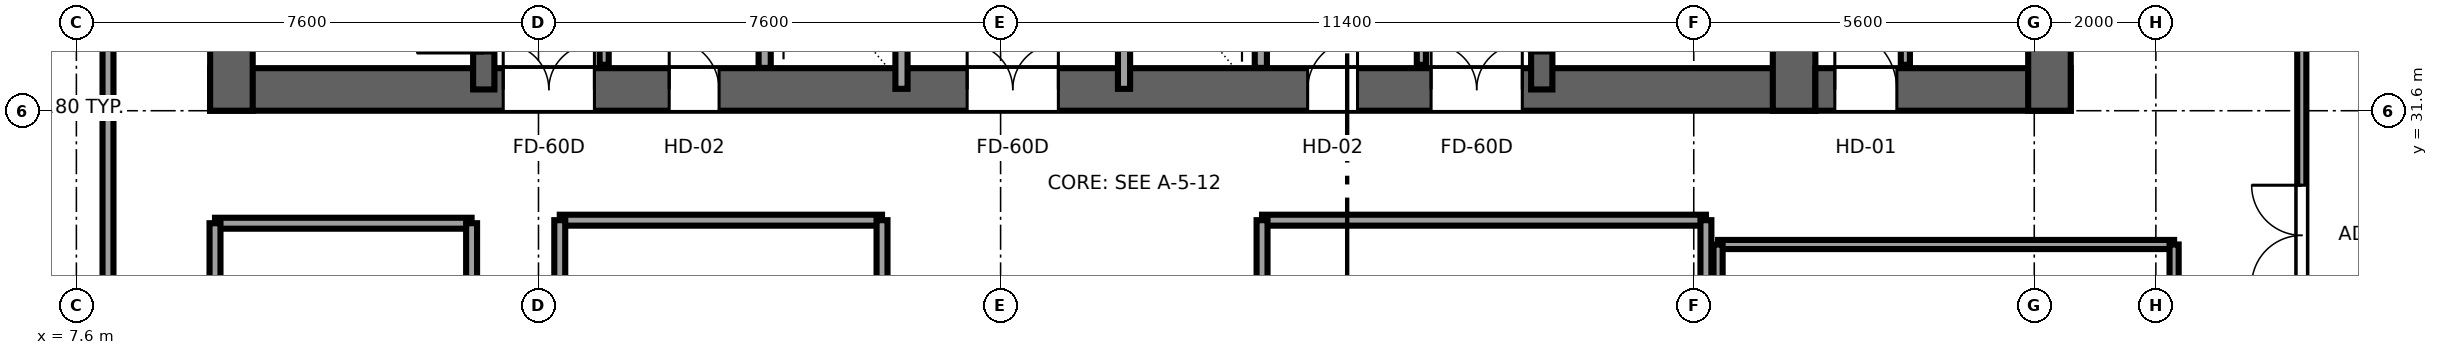
"""IFC4 building model, lengths in metres.
Left out: names, types, materials, properties, quantities, classifications, styles, units other than length and angle.
Written with IfcOpenShell. Run it as: python <this file> out.ifc"""

import sys

from ifc_helpers import new_model, si_unit, direction, frame, frame_2d, origin, place, context, subcontext, project, spatial, rectangle, extrude, source, transform, mapped, element, fill, save


model = new_model("IFC4")
c1 = context("Model", 3, precision=1e-05, world=origin(), true_north=direction((0.0, 1.0)))
c2 = subcontext(c1, "Body", "Model", "MODEL_VIEW")
j1 = project(units=[si_unit("LENGTHUNIT", "METRE"), si_unit("PLANEANGLEUNIT", "RADIAN")], contexts=[c1])
p1 = place(None, origin())
s1 = spatial("IfcSite", under=j1, at=p1, CompositionType="ELEMENT")
p2 = place(p1, origin())
s2 = spatial("IfcBuilding", under=s1, at=p2, CompositionType="ELEMENT")
p3 = place(p2, frame((0.0, 0.0, 104.45)))
s3 = spatial("IfcBuildingStorey", under=s2, at=p3, CompositionType="ELEMENT", Elevation=104.45)
p4 = place(p3, frame((9.8, 31.95, 0.0), z_axis=(0.0, 0.0, 1.0), x_axis=(1.0, 0.0, 0.0)))
e1 = element("IfcWall", 1, at=p4, inside=s3, PredefinedType="SHEAR", context=c2, shape_type="SweptSolid", body=[
    extrude(rectangle(XDim=26.4, YDim=0.7, at=frame_2d((13.2, 0.0))), origin(), (0.0, 0.0, 1.0), 3.55),
])
p5 = place(p4, frame((6.32, 0.0, 0.0), z_axis=(0.0, 0.0, 1.0), x_axis=(-1.0, 0.0, 0.0)))
e2 = element("IfcOpeningElement", 2, at=p5, cuts=e1, PredefinedType="OPENING", context=c2, shape_type="SweptSolid", body=[
    extrude(rectangle(XDim=1.5, YDim=2.04, at=frame_2d((0.75, 1.02))), frame((0.0, 0.36, 0.0), z_axis=(0.0, -1.0, 0.0), x_axis=(1.0, 0.0, 0.0)), (0.0, 0.0, 1.0), 0.72),
])
p6 = place(p4, frame((13.95, 0.0, 0.0), z_axis=(0.0, 0.0, 1.0), x_axis=(-1.0, 0.0, 0.0)))
e3 = element("IfcOpeningElement", 3, at=p6, cuts=e1, PredefinedType="OPENING", context=c2, shape_type="SweptSolid", body=[
    extrude(rectangle(XDim=1.5, YDim=2.04, at=frame_2d((0.75, 1.02))), frame((0.0, 0.36, 0.0), z_axis=(0.0, -1.0, 0.0), x_axis=(1.0, 0.0, 0.0)), (0.0, 0.0, 1.0), 0.72),
])
p7 = place(p4, frame((21.58, 0.0, 0.0), z_axis=(0.0, 0.0, 1.0), x_axis=(-1.0, 0.0, 0.0)))
e4 = element("IfcOpeningElement", 4, at=p7, cuts=e1, PredefinedType="OPENING", context=c2, shape_type="SweptSolid", body=[
    extrude(rectangle(XDim=1.5, YDim=2.04, at=frame_2d((0.75, 1.02))), frame((0.0, 0.36, 0.0), z_axis=(0.0, -1.0, 0.0), x_axis=(1.0, 0.0, 0.0)), (0.0, 0.0, 1.0), 0.72),
])
p8 = place(p4, frame((8.37, 0.0, 0.0), z_axis=(0.0, 0.0, 1.0), x_axis=(-1.0, 0.0, 0.0)))
e5 = element("IfcOpeningElement", 5, at=p8, cuts=e1, PredefinedType="OPENING", context=c2, shape_type="SweptSolid", body=[
    extrude(rectangle(XDim=0.82, YDim=2.01, at=frame_2d((0.41, 1.005))), frame((0.0, 0.36, 0.0), z_axis=(0.0, -1.0, 0.0), x_axis=(1.0, 0.0, 0.0)), (0.0, 0.0, 1.0), 0.72),
])
p9 = place(p4, frame((18.87, 0.0, 0.0), z_axis=(0.0, 0.0, 1.0), x_axis=(-1.0, 0.0, 0.0)))
e6 = element("IfcOpeningElement", 6, at=p9, cuts=e1, PredefinedType="OPENING", context=c2, shape_type="SweptSolid", body=[
    extrude(rectangle(XDim=0.82, YDim=2.01, at=frame_2d((0.41, 1.005))), frame((0.0, 0.36, 0.0), z_axis=(0.0, -1.0, 0.0), x_axis=(1.0, 0.0, 0.0)), (0.0, 0.0, 1.0), 0.72),
])
for number, where, z_axis, x_axis in (
    (7, (10.15, 31.6, 0.0), (0.0, 0.0, 1.0), (0.0, 1.0, 0.0)),
    (8, (35.85, 31.6, 0.0), (0.0, 0.0, 1.0), (0.0, 1.0, 0.0)),
):
    element("IfcWall", number, at=place(p3, frame(where, z_axis=z_axis, x_axis=x_axis)), inside=s3, PredefinedType="SHEAR", context=c2, shape_type="SweptSolid", body=[
        extrude(rectangle(XDim=13.6, YDim=0.7, at=frame_2d((6.8, 0.0))), origin(), (0.0, 0.0, 1.0), 3.55),
    ])
p10 = place(p3, frame((14.3, 31.95, 0.0), z_axis=(0.0, 0.0, 1.0), x_axis=(0.0, 1.0, 0.0)))
e9 = element("IfcWall", 9, at=p10, inside=s3, PredefinedType="SHEAR", context=c2, shape_type="SweptSolid", body=[
    extrude(rectangle(XDim=12.9, YDim=0.35, at=frame_2d((6.45, 0.0))), origin(), (0.0, 0.0, 1.0), 3.55),
])
p11 = place(p10, frame((0.6, 0.0, 0.0)))
e10 = element("IfcOpeningElement", 10, at=p11, cuts=e9, PredefinedType="OPENING", context=c2, shape_type="SweptSolid", body=[
    extrude(rectangle(XDim=1.1, YDim=2.12, at=frame_2d((0.55, 1.06))), frame((0.0, 0.185, 0.0), z_axis=(0.0, -1.0, 0.0), x_axis=(1.0, 0.0, 0.0)), (0.0, 0.0, 1.0), 0.37),
])
p12 = place(p3, frame((31.7, 31.95, 0.0), z_axis=(0.0, 0.0, 1.0), x_axis=(0.0, 1.0, 0.0)))
e11 = element("IfcWall", 11, at=p12, inside=s3, PredefinedType="SHEAR", context=c2, shape_type="SweptSolid", body=[
    extrude(rectangle(XDim=12.9, YDim=0.35, at=frame_2d((6.45, 0.0))), origin(), (0.0, 0.0, 1.0), 3.55),
])
p13 = place(p12, frame((1.7, 0.0, 0.0), z_axis=(0.0, 0.0, 1.0), x_axis=(-1.0, 0.0, 0.0)))
e12 = element("IfcOpeningElement", 12, at=p13, cuts=e11, PredefinedType="OPENING", context=c2, shape_type="SweptSolid", body=[
    extrude(rectangle(XDim=1.1, YDim=2.12, at=frame_2d((0.55, 1.06))), frame((0.0, 0.185, 0.0), z_axis=(0.0, -1.0, 0.0), x_axis=(1.0, 0.0, 0.0)), (0.0, 0.0, 1.0), 0.37),
])
p14 = place(p3, frame((36.2, 31.95, 0.0), z_axis=(0.0, 0.0, 1.0), x_axis=(1.0, 0.0, 0.0)))
e13 = element("IfcWall", 13, at=p14, inside=s3, PredefinedType="SHEAR", context=c2, shape_type="SweptSolid", body=[
    extrude(rectangle(XDim=4.2, YDim=0.7, at=frame_2d((2.1, 0.0))), origin(), (0.0, 0.0, 1.0), 3.55),
])
p15 = place(p14, frame((1.34, 0.0, 0.0), z_axis=(0.0, 0.0, 1.0), x_axis=(-1.0, 0.0, 0.0)))
e14 = element("IfcOpeningElement", 14, at=p15, cuts=e13, PredefinedType="OPENING", context=c2, shape_type="SweptSolid", body=[
    extrude(rectangle(XDim=1.02, YDim=2.03, at=frame_2d((0.51, 1.015))), frame((0.0, 0.36, 0.0), z_axis=(0.0, -1.0, 0.0), x_axis=(1.0, 0.0, 0.0)), (0.0, 0.0, 1.0), 0.72),
])
p16 = place(p3, frame((40.05, 31.6, 0.0), z_axis=(0.0, 0.0, 1.0), x_axis=(0.0, 1.0, 0.0)))
e15 = element("IfcWall", 15, at=p16, inside=s3, PredefinedType="SHEAR", context=c2, shape_type="SweptSolid", body=[
    extrude(rectangle(XDim=13.6, YDim=0.7, at=frame_2d((6.8, 0.0))), origin(), (0.0, 0.0, 1.0), 3.55),
])
for number, where, z_axis, x_axis in (
    (16, (18.92, 32.304, 0.0), (0.0, 0.0, 1.0), (0.0, 1.0, 0.0)),
    (17, (27.08, 32.304, 0.0), (0.0, 0.0, 1.0), (0.0, 1.0, 0.0)),
):
    element("IfcWall", number, at=place(p3, frame(where, z_axis=z_axis, x_axis=x_axis)), inside=s3, PredefinedType="SOLIDWALL", context=c2, shape_type="SweptSolid", body=[
        extrude(rectangle(XDim=3.846, YDim=0.2, at=frame_2d((1.923, 0.0))), origin(), (0.0, 0.0, 1.0), 3.37),
    ])
p17 = place(p3, frame((21.17, 31.96, 0.0), z_axis=(0.0, 0.0, 1.0), x_axis=(0.0, 1.0, 0.0)))
e18 = element("IfcWall", 18, at=p17, inside=s3, PredefinedType="SOLIDWALL", context=c2, shape_type="SweptSolid", body=[
    extrude(rectangle(XDim=12.58, YDim=0.2, at=frame_2d((6.29, 0.0))), origin(), (0.0, 0.0, 1.0), 3.37),
])
p18 = place(p17, frame((5.74, 0.0, 0.0)))
e19 = element("IfcOpeningElement", 19, at=p18, cuts=e18, PredefinedType="OPENING", context=c2, shape_type="SweptSolid", body=[
    extrude(rectangle(XDim=1.1, YDim=2.12, at=frame_2d((0.55, 1.06))), frame((0.0, 0.11, 0.0), z_axis=(0.0, -1.0, 0.0), x_axis=(1.0, 0.0, 0.0)), (0.0, 0.0, 1.0), 0.22),
])
p19 = place(p17, frame((8.24, 0.0, 0.0)))
e20 = element("IfcOpeningElement", 20, at=p19, cuts=e18, PredefinedType="OPENING", context=c2, shape_type="SweptSolid", body=[
    extrude(rectangle(XDim=1.1, YDim=2.12, at=frame_2d((0.55, 1.06))), frame((0.0, 0.11, 0.0), z_axis=(0.0, -1.0, 0.0), x_axis=(1.0, 0.0, 0.0)), (0.0, 0.0, 1.0), 0.22),
])
p20 = place(p3, frame((24.83, 31.96, 0.0), z_axis=(0.0, 0.0, 1.0), x_axis=(0.0, 1.0, 0.0)))
e21 = element("IfcWall", 21, at=p20, inside=s3, PredefinedType="SOLIDWALL", context=c2, shape_type="SweptSolid", body=[
    extrude(rectangle(XDim=12.58, YDim=0.2, at=frame_2d((6.29, 0.0))), origin(), (0.0, 0.0, 1.0), 3.37),
])
p21 = place(p20, frame((5.74, 0.0, 0.0)))
e22 = element("IfcOpeningElement", 22, at=p21, cuts=e21, PredefinedType="OPENING", context=c2, shape_type="SweptSolid", body=[
    extrude(rectangle(XDim=1.1, YDim=2.12, at=frame_2d((0.55, 1.06))), frame((0.0, 0.11, 0.0), z_axis=(0.0, -1.0, 0.0), x_axis=(1.0, 0.0, 0.0)), (0.0, 0.0, 1.0), 0.22),
])
p22 = place(p20, frame((8.24, 0.0, 0.0)))
e23 = element("IfcOpeningElement", 23, at=p22, cuts=e21, PredefinedType="OPENING", context=c2, shape_type="SweptSolid", body=[
    extrude(rectangle(XDim=1.1, YDim=2.12, at=frame_2d((0.55, 1.06))), frame((0.0, 0.11, 0.0), z_axis=(0.0, -1.0, 0.0), x_axis=(1.0, 0.0, 0.0)), (0.0, 0.0, 1.0), 0.22),
])
for number, where, z_axis, x_axis in (
    (24, (16.28, 32.355, 0.0), (0.0, 0.0, 1.0), (0.0, 1.0, 0.0)),
    (25, (29.72, 32.355, 0.0), (0.0, 0.0, 1.0), (0.0, 1.0, 0.0)),
):
    element("IfcWall", number, at=place(p3, frame(where, z_axis=z_axis, x_axis=x_axis)), inside=s3, PredefinedType="PARTITIONING", context=c2, shape_type="SweptSolid", body=[
        extrude(rectangle(XDim=0.865, YDim=0.15, at=frame_2d((0.433, 0.0))), origin(), (0.0, 0.0, 1.0), 3.37),
    ])
p23 = place(p3, frame((37.68, 32.355, 0.0), z_axis=(0.0, 0.0, 1.0), x_axis=(0.0, 1.0, 0.0)))
e26 = element("IfcWall", 26, at=p23, inside=s3, PredefinedType="PARTITIONING", context=c2, shape_type="SweptSolid", body=[
    extrude(rectangle(XDim=7.845, YDim=0.15, at=frame_2d((3.922, 0.0))), origin(), (0.0, 0.0, 1.0), 3.37),
])
p24 = place(p23, frame((3.413, 0.0, 0.0)))
e27 = element("IfcOpeningElement", 27, at=p24, cuts=e26, PredefinedType="OPENING", context=c2, shape_type="SweptSolid", body=[
    extrude(rectangle(XDim=1.02, YDim=2.03, at=frame_2d((0.51, 1.015))), frame((0.0, 0.085, 0.0), z_axis=(0.0, -1.0, 0.0), x_axis=(1.0, 0.0, 0.0)), (0.0, 0.0, 1.0), 0.17),
])
p25 = place(p3, frame((8.12, 20.7, 0.0), z_axis=(0.0, 0.0, 1.0), x_axis=(0.0, 1.0, 0.0)))
e28 = element("IfcWall", 28, at=p25, inside=s3, PredefinedType="PARTITIONING", context=c2, shape_type="SweptSolid", body=[
    extrude(rectangle(XDim=15.1, YDim=0.18, at=frame_2d((7.55, 0.0))), origin(), (0.0, 0.0, 1.0), 3.37),
])
p26 = place(p25, frame((5.15, 0.0, 0.0)))
e29 = element("IfcOpeningElement", 29, at=p26, cuts=e28, PredefinedType="OPENING", context=c2, shape_type="SweptSolid", body=[
    extrude(rectangle(XDim=1.65, YDim=2.15, at=frame_2d((0.825, 1.075))), frame((0.0, 0.1, 0.0), z_axis=(0.0, -1.0, 0.0), x_axis=(1.0, 0.0, 0.0)), (0.0, 0.0, 1.0), 0.2),
])
p27 = place(p3, frame((44.2, 24.5, 0.0), z_axis=(0.0, 0.0, 1.0), x_axis=(0.0, 1.0, 0.0)))
e30 = element("IfcWall", 30, at=p27, inside=s3, PredefinedType="PARTITIONING", context=c2, shape_type="SweptSolid", body=[
    extrude(rectangle(XDim=10.1, YDim=0.15, at=frame_2d((5.05, 0.0))), origin(), (0.0, 0.0, 1.0), 3.37),
])
p28 = place(p27, frame((4.225, 0.0, 0.0)))
e31 = element("IfcOpeningElement", 31, at=p28, cuts=e30, PredefinedType="OPENING", context=c2, shape_type="SweptSolid", body=[
    extrude(rectangle(XDim=1.65, YDim=2.15, at=frame_2d((0.825, 1.075))), frame((0.0, 0.085, 0.0), z_axis=(0.0, -1.0, 0.0), x_axis=(1.0, 0.0, 0.0)), (0.0, 0.0, 1.0), 0.17),
])
p29 = place(p3, frame((9.88, 29.75, 0.0), z_axis=(0.0, 0.0, 1.0), x_axis=(1.0, 0.0, 0.0)))
e32 = element("IfcWall", 32, at=p29, inside=s3, PredefinedType="PARTITIONING", context=c2, shape_type="SweptSolid", body=[
    extrude(rectangle(XDim=4.22, YDim=0.18, at=frame_2d((2.11, 0.0))), origin(), (0.0, 0.0, 1.0), 3.37),
])
for number, where, z_axis, x_axis in (
    (33, (9.88, 20.7, 0.0), (0.0, 0.0, 1.0), (0.0, 1.0, 0.0)),
    (34, (14.1, 20.7, 0.0), (0.0, 0.0, 1.0), (0.0, 1.0, 0.0)),
):
    element("IfcWall", number, at=place(p3, frame(where, z_axis=z_axis, x_axis=x_axis)), inside=s3, PredefinedType="PARTITIONING", context=c2, shape_type="SweptSolid", body=[
        extrude(rectangle(XDim=9.05, YDim=0.18, at=frame_2d((4.525, 0.0))), origin(), (0.0, 0.0, 1.0), 3.37),
    ])
p30 = place(p3, frame((27.1, 29.8, 0.0), z_axis=(0.0, 0.0, 1.0), x_axis=(1.0, 0.0, 0.0)))
e35 = element("IfcWall", 35, at=p30, inside=s3, PredefinedType="PARTITIONING", context=c2, shape_type="SweptSolid", body=[
    extrude(rectangle(XDim=7.3, YDim=0.18, at=frame_2d((3.65, 0.0))), origin(), (0.0, 0.0, 1.0), 3.37),
])
for number, where, z_axis, x_axis in (
    (36, (27.1, 20.7, 0.0), (0.0, 0.0, 1.0), (0.0, 1.0, 0.0)),
    (37, (34.4, 20.7, 0.0), (0.0, 0.0, 1.0), (0.0, 1.0, 0.0)),
):
    element("IfcWall", number, at=place(p3, frame(where, z_axis=z_axis, x_axis=x_axis)), inside=s3, PredefinedType="PARTITIONING", context=c2, shape_type="SweptSolid", body=[
        extrude(rectangle(XDim=9.1, YDim=0.18, at=frame_2d((4.55, 0.0))), origin(), (0.0, 0.0, 1.0), 3.37),
    ])
p31 = place(p3, frame((15.55, 29.8, 0.0), z_axis=(0.0, 0.0, 1.0), x_axis=(1.0, 0.0, 0.0)))
e38 = element("IfcWall", 38, at=p31, inside=s3, PredefinedType="PARTITIONING", context=c2, shape_type="SweptSolid", body=[
    extrude(rectangle(XDim=5.3, YDim=0.18, at=frame_2d((2.65, 0.0))), origin(), (0.0, 0.0, 1.0), 3.37),
])
for number, where, z_axis, x_axis in (
    (39, (15.55, 20.7, 0.0), (0.0, 0.0, 1.0), (0.0, 1.0, 0.0)),
    (40, (20.85, 20.7, 0.0), (0.0, 0.0, 1.0), (0.0, 1.0, 0.0)),
):
    element("IfcWall", number, at=place(p3, frame(where, z_axis=z_axis, x_axis=x_axis)), inside=s3, PredefinedType="PARTITIONING", context=c2, shape_type="SweptSolid", body=[
        extrude(rectangle(XDim=9.1, YDim=0.18, at=frame_2d((4.55, 0.0))), origin(), (0.0, 0.0, 1.0), 3.37),
    ])
p32 = place(p3, frame((34.6, 29.4, 0.0), z_axis=(0.0, 0.0, 1.0), x_axis=(1.0, 0.0, 0.0)))
e41 = element("IfcWall", 41, at=p32, inside=s3, PredefinedType="PARTITIONING", context=c2, shape_type="SweptSolid", body=[
    extrude(rectangle(XDim=7.5, YDim=0.15, at=frame_2d((3.75, 0.0))), origin(), (0.0, 0.0, 1.0), 3.37),
])
p33 = place(p3, frame((34.6, 20.7, 0.0), z_axis=(0.0, 0.0, 1.0), x_axis=(0.0, 1.0, 0.0)))
e42 = element("IfcWall", 42, at=p33, inside=s3, PredefinedType="PARTITIONING", context=c2, shape_type="SweptSolid", body=[
    extrude(rectangle(XDim=8.7, YDim=0.15, at=frame_2d((4.35, 0.0))), origin(), (0.0, 0.0, 1.0), 3.37),
])
p34 = place(p3, frame((42.1, 20.7, 0.0), z_axis=(0.0, 0.0, 1.0), x_axis=(0.0, 1.0, 0.0)))
e43 = element("IfcWall", 43, at=p34, inside=s3, PredefinedType="PARTITIONING", context=c2, shape_type="SweptSolid", body=[
    extrude(rectangle(XDim=8.7, YDim=0.15, at=frame_2d((4.35, 0.0))), origin(), (0.0, 0.0, 1.0), 2.16),
])
m1 = source(origin(), c2, "Body", "SweptSolid", [
    extrude(rectangle(XDim=1.1, YDim=2.12, at=frame_2d((0.55, 1.06))), frame((0.0, 0.025, 0.0), z_axis=(0.0, -1.0, 0.0), x_axis=(1.0, 0.0, 0.0)), (0.0, 0.0, 1.0), 0.05),
])
p35 = place(p11, origin())
e44 = element("IfcDoor", 44, at=p35, inside=s3, OperationType="SINGLE_SWING_LEFT", PredefinedType="DOOR", context=c2, shape_type="MappedRepresentation", body=[
    mapped(m1, transform((0.0, 0.0, 0.0), x_axis=(1.0, 0.0, 0.0), y_axis=(0.0, 1.0, 0.0), z_axis=(0.0, 0.0, 1.0), scale=1.0)),
])
fill(e10, e44)
p36 = place(p13, origin())
e45 = element("IfcDoor", 45, at=p36, inside=s3, OperationType="SINGLE_SWING_RIGHT", PredefinedType="DOOR", context=c2, shape_type="MappedRepresentation", body=[
    mapped(m1, transform((0.0, 0.0, 0.0), x_axis=(1.0, 0.0, 0.0), y_axis=(0.0, 1.0, 0.0), z_axis=(0.0, 0.0, 1.0), scale=1.0)),
])
fill(e12, e45)
m2 = source(origin(), c2, "Body", "SweptSolid", [
    extrude(rectangle(XDim=1.5, YDim=2.04, at=frame_2d((0.75, 1.02))), frame((0.0, 0.025, 0.0), z_axis=(0.0, -1.0, 0.0), x_axis=(1.0, 0.0, 0.0)), (0.0, 0.0, 1.0), 0.05),
])
p37 = place(p5, origin())
e46 = element("IfcDoor", 46, at=p37, inside=s3, OperationType="DOUBLE_DOOR_SINGLE_SWING", PredefinedType="DOOR", context=c2, shape_type="MappedRepresentation", body=[
    mapped(m2, transform((0.0, 0.0, 0.0), x_axis=(1.0, 0.0, 0.0), y_axis=(0.0, 1.0, 0.0), z_axis=(0.0, 0.0, 1.0), scale=1.0)),
])
fill(e2, e46)
p38 = place(p6, origin())
e47 = element("IfcDoor", 47, at=p38, inside=s3, OperationType="DOUBLE_DOOR_SINGLE_SWING", PredefinedType="DOOR", context=c2, shape_type="MappedRepresentation", body=[
    mapped(m2, transform((0.0, 0.0, 0.0), x_axis=(1.0, 0.0, 0.0), y_axis=(0.0, 1.0, 0.0), z_axis=(0.0, 0.0, 1.0), scale=1.0)),
])
fill(e3, e47)
p39 = place(p7, origin())
e48 = element("IfcDoor", 48, at=p39, inside=s3, OperationType="DOUBLE_DOOR_SINGLE_SWING", PredefinedType="DOOR", context=c2, shape_type="MappedRepresentation", body=[
    mapped(m2, transform((0.0, 0.0, 0.0), x_axis=(1.0, 0.0, 0.0), y_axis=(0.0, 1.0, 0.0), z_axis=(0.0, 0.0, 1.0), scale=1.0)),
])
fill(e4, e48)
m3 = source(origin(), c2, "Body", "SweptSolid", [
    extrude(rectangle(XDim=0.82, YDim=2.01, at=frame_2d((0.41, 1.005))), frame((0.0, 0.025, 0.0), z_axis=(0.0, -1.0, 0.0), x_axis=(1.0, 0.0, 0.0)), (0.0, 0.0, 1.0), 0.05),
])
p40 = place(p8, origin())
e49 = element("IfcDoor", 49, at=p40, inside=s3, OperationType="SINGLE_SWING_LEFT", PredefinedType="DOOR", context=c2, shape_type="MappedRepresentation", body=[
    mapped(m3, transform((0.0, 0.0, 0.0), x_axis=(1.0, 0.0, 0.0), y_axis=(0.0, 1.0, 0.0), z_axis=(0.0, 0.0, 1.0), scale=1.0)),
])
fill(e5, e49)
p41 = place(p9, origin())
e50 = element("IfcDoor", 50, at=p41, inside=s3, OperationType="SINGLE_SWING_RIGHT", PredefinedType="DOOR", context=c2, shape_type="MappedRepresentation", body=[
    mapped(m3, transform((0.0, 0.0, 0.0), x_axis=(1.0, 0.0, 0.0), y_axis=(0.0, 1.0, 0.0), z_axis=(0.0, 0.0, 1.0), scale=1.0)),
])
fill(e6, e50)
m4 = source(origin(), c2, "Body", "SweptSolid", [
    extrude(rectangle(XDim=1.02, YDim=2.03, at=frame_2d((0.51, 1.015))), frame((0.0, 0.025, 0.0), z_axis=(0.0, -1.0, 0.0), x_axis=(1.0, 0.0, 0.0)), (0.0, 0.0, 1.0), 0.05),
])
p42 = place(p15, origin())
e51 = element("IfcDoor", 51, at=p42, inside=s3, OperationType="SINGLE_SWING_LEFT", PredefinedType="DOOR", context=c2, shape_type="MappedRepresentation", body=[
    mapped(m4, transform((0.0, 0.0, 0.0), x_axis=(1.0, 0.0, 0.0), y_axis=(0.0, 1.0, 0.0), z_axis=(0.0, 0.0, 1.0), scale=1.0)),
])
fill(e14, e51)
m5 = source(origin(), c2, "Body", "SweptSolid", [
    extrude(rectangle(XDim=1.65, YDim=2.15, at=frame_2d((0.825, 1.075))), frame((0.0, 0.025, 0.0), z_axis=(0.0, -1.0, 0.0), x_axis=(1.0, 0.0, 0.0)), (0.0, 0.0, 1.0), 0.05),
])
p43 = place(p28, origin())
e52 = element("IfcDoor", 52, at=p43, inside=s3, OperationType="DOUBLE_DOOR_SINGLE_SWING", PredefinedType="DOOR", context=c2, shape_type="MappedRepresentation", body=[
    mapped(m5, transform((0.0, 0.0, 0.0), x_axis=(1.0, 0.0, 0.0), y_axis=(0.0, 1.0, 0.0), z_axis=(0.0, 0.0, 1.0), scale=1.0)),
])
fill(e31, e52)
save(model, sys.argv[1])
